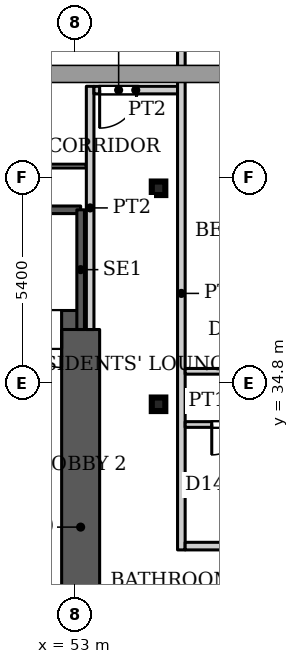
"""IFC4 building model, lengths in metres.
Left out: names, types, materials, properties, quantities, classifications, styles, units other than length and angle.
Written with IfcOpenShell. Run it as: python <this file> out.ifc"""

import sys

from ifc_helpers import new_model, si_unit, direction, frame, frame_2d, origin, origin_2d, place, context, subcontext, project, spatial, rectangle, hollow_rectangle, extrude, source, transform, mapped, element, fill, save


model = new_model("IFC4")
c1 = context("Model", 3, precision=1e-05, world=origin(), true_north=direction((0.0, 1.0)))
c2 = subcontext(c1, "Body", "Model", "MODEL_VIEW")
j1 = project(units=[si_unit("LENGTHUNIT", "METRE"), si_unit("PLANEANGLEUNIT", "RADIAN")], contexts=[c1])
p1 = place(None, origin())
s1 = spatial("IfcSite", under=j1, at=p1, CompositionType="ELEMENT")
p2 = place(p1, origin())
s2 = spatial("IfcBuilding", under=s1, at=p2, CompositionType="ELEMENT")
p3 = place(p2, frame((0.0, 0.0, 65.6)))
s3 = spatial("IfcBuildingStorey", under=s2, at=p3, CompositionType="ELEMENT", Elevation=65.6)
for number, where, z_axis, x_axis in (
    (1, (55.2, 34.232, 0.0), (0.0, 0.0, 1.0), (1.0, 0.0, 0.0)),
    (2, (55.2, 39.916, 0.0), (0.0, 0.0, 1.0), (1.0, 0.0, 0.0)),
):
    element("IfcColumn", number, at=place(p3, frame(where, z_axis=z_axis, x_axis=x_axis)), inside=s3, PredefinedType="COLUMN", context=c2, shape_type="SweptSolid", body=[
        extrude(hollow_rectangle(XDim=0.356, YDim=0.356, WallThickness=0.016, InnerFilletRadius=0.016, OuterFilletRadius=0.032, at=origin_2d()), origin(), (0.0, 0.0, 1.0), 3.9),
    ])
p4 = place(p3, frame((34.75, 36.2, 0.0), z_axis=(0.0, 0.0, 1.0), x_axis=(1.0, 0.0, 0.0)))
e3 = element("IfcWall", 3, at=p4, inside=s3, PredefinedType="SHEAR", context=c2, shape_type="SweptSolid", body=[
    extrude(rectangle(XDim=18.4, YDim=1.0, at=frame_2d((9.2, 0.0))), origin(), (0.0, 0.0, 1.0), 3.9),
])
p5 = place(p4, frame((16.9, 0.0, 0.0)))
e4 = element("IfcOpeningElement", 4, at=p5, cuts=e3, PredefinedType="OPENING", context=c2, shape_type="SweptSolid", body=[
    extrude(rectangle(XDim=1.0, YDim=2.2, at=frame_2d((0.5, 1.1))), frame((0.0, 0.51, 0.0), z_axis=(0.0, -1.0, 0.0), x_axis=(1.0, 0.0, 0.0)), (0.0, 0.0, 1.0), 1.02),
])
p6 = place(p3, frame((53.15, 25.8, 0.0), z_axis=(0.0, 0.0, 1.0), x_axis=(0.0, 1.0, 0.0)))
e5 = element("IfcWall", 5, at=p6, inside=s3, PredefinedType="SHEAR", context=c2, shape_type="SweptSolid", body=[
    extrude(rectangle(XDim=10.4, YDim=1.0, at=frame_2d((5.2, 0.0))), origin(), (0.0, 0.0, 1.0), 3.9),
])
p7 = place(p6, frame((1.175, 0.0, 0.0)))
e6 = element("IfcOpeningElement", 6, at=p7, cuts=e5, PredefinedType="OPENING", context=c2, shape_type="SweptSolid", body=[
    extrude(rectangle(XDim=0.9, YDim=2.2, at=frame_2d((0.45, 1.1))), frame((0.0, 0.51, 0.0), z_axis=(0.0, -1.0, 0.0), x_axis=(1.0, 0.0, 0.0)), (0.0, 0.0, 1.0), 1.02),
])
p8 = place(p3, frame((43.99, 39.35, 0.0), z_axis=(0.0, 0.0, 1.0), x_axis=(1.0, 0.0, 0.0)))
e7 = element("IfcWall", 7, at=p8, inside=s3, PredefinedType="SHEAR", context=c2, shape_type="SweptSolid", body=[
    extrude(rectangle(XDim=9.16, YDim=0.2, at=frame_2d((4.58, 0.0))), origin(), (0.0, 0.0, 1.0), 3.9),
])
p9 = place(p3, frame((53.15, 36.2, 0.0), z_axis=(0.0, 0.0, 1.0), x_axis=(0.0, 1.0, 0.0)))
e8 = element("IfcWall", 8, at=p9, inside=s3, PredefinedType="SHEAR", context=c2, shape_type="SweptSolid", body=[
    extrude(rectangle(XDim=3.15, YDim=0.2, at=frame_2d((1.575, 0.0))), origin(), (0.0, 0.0, 1.0), 3.9),
])
p10 = place(p3, frame((38.499, 40.5, 0.0), z_axis=(0.0, 0.0, 1.0), x_axis=(1.0, 0.0, 0.0)))
e9 = element("IfcWall", 9, at=p10, inside=s3, PredefinedType="PARTITIONING", context=c2, shape_type="SweptSolid", body=[
    extrude(rectangle(XDim=14.801, YDim=0.1, at=frame_2d((7.4, 0.0))), origin(), (0.0, 0.0, 1.0), 3.6),
])
p11 = place(p10, frame((6.701, 0.0, 0.0)))
e10 = element("IfcOpeningElement", 10, at=p11, cuts=e9, PredefinedType="OPENING", context=c2, shape_type="SweptSolid", body=[
    extrude(rectangle(XDim=1.0, YDim=2.1, at=frame_2d((0.5, 1.05))), frame((0.0, 0.06, 0.0), z_axis=(0.0, -1.0, 0.0), x_axis=(1.0, 0.0, 0.0)), (0.0, 0.0, 1.0), 0.12),
])
p12 = place(p3, frame((53.4, 36.199, 0.0), z_axis=(0.0, 0.0, 1.0), x_axis=(0.0, 1.0, 0.0)))
e11 = element("IfcWall", 11, at=p12, inside=s3, PredefinedType="PARTITIONING", context=c2, shape_type="SweptSolid", body=[
    extrude(rectangle(XDim=6.401, YDim=0.2, at=frame_2d((3.201, 0.0))), origin(), (0.0, 0.0, 1.0), 3.6),
])
p13 = place(p3, frame((53.5, 42.5, 0.0), z_axis=(0.0, 0.0, 1.0), x_axis=(1.0, 0.0, 0.0)))
e12 = element("IfcWall", 12, at=p13, inside=s3, PredefinedType="PARTITIONING", context=c2, shape_type="SweptSolid", body=[
    extrude(rectangle(XDim=2.2, YDim=0.2, at=frame_2d((1.1, 0.0))), origin(), (0.0, 0.0, 1.0), 3.6),
])
p14 = place(p13, frame((0.15, 0.0, 0.0)))
e13 = element("IfcOpeningElement", 13, at=p14, cuts=e12, PredefinedType="OPENING", context=c2, shape_type="SweptSolid", body=[
    extrude(rectangle(XDim=1.0, YDim=2.1, at=frame_2d((0.5, 1.05))), frame((0.0, 0.11, 0.0), z_axis=(0.0, -1.0, 0.0), x_axis=(1.0, 0.0, 0.0)), (0.0, 0.0, 1.0), 0.22),
])
p15 = place(p3, frame((55.8, 30.4, 0.0), z_axis=(0.0, 0.0, 1.0), x_axis=(0.0, 1.0, 0.0)))
e14 = element("IfcWall", 14, at=p15, inside=s3, PredefinedType="PARTITIONING", context=c2, shape_type="SweptSolid", body=[
    extrude(rectangle(XDim=13.5, YDim=0.2, at=frame_2d((6.75, 0.0))), origin(), (0.0, 0.0, 1.0), 3.6),
])
p16 = place(p3, frame((55.9, 30.5, 0.0), z_axis=(0.0, 0.0, 1.0), x_axis=(1.0, 0.0, 0.0)))
e15 = element("IfcWall", 15, at=p16, inside=s3, PredefinedType="PARTITIONING", context=c2, shape_type="SweptSolid", body=[
    extrude(rectangle(XDim=42.2, YDim=0.2, at=frame_2d((21.1, 0.0))), origin(), (0.0, 0.0, 1.0), 3.6),
])
p17 = place(p16, frame((14.7, 0.0, 0.0)))
e16 = element("IfcOpeningElement", 16, at=p17, cuts=e15, PredefinedType="OPENING", context=c2, shape_type="SweptSolid", body=[
    extrude(rectangle(XDim=1.0, YDim=2.1, at=frame_2d((0.5, 1.05))), frame((0.0, 0.11, 0.0), z_axis=(0.0, -1.0, 0.0), x_axis=(1.0, 0.0, 0.0)), (0.0, 0.0, 1.0), 0.22),
])
p18 = place(p16, frame((27.9, 0.0, 0.0)))
e17 = element("IfcOpeningElement", 17, at=p18, cuts=e15, PredefinedType="OPENING", context=c2, shape_type="SweptSolid", body=[
    extrude(rectangle(XDim=1.0, YDim=2.1, at=frame_2d((0.5, 1.05))), frame((0.0, 0.11, 0.0), z_axis=(0.0, -1.0, 0.0), x_axis=(1.0, 0.0, 0.0)), (0.0, 0.0, 1.0), 0.22),
])
p19 = place(p16, frame((39.0, 0.0, 0.0)))
e18 = element("IfcOpeningElement", 18, at=p19, cuts=e15, PredefinedType="OPENING", context=c2, shape_type="SweptSolid", body=[
    extrude(rectangle(XDim=1.0, YDim=2.1, at=frame_2d((0.5, 1.05))), frame((0.0, 0.11, 0.0), z_axis=(0.0, -1.0, 0.0), x_axis=(1.0, 0.0, 0.0)), (0.0, 0.0, 1.0), 0.22),
])
p20 = place(p3, frame((55.9, 33.7, 0.0), z_axis=(0.0, 0.0, 1.0), x_axis=(1.0, 0.0, 0.0)))
e19 = element("IfcWall", 19, at=p20, inside=s3, PredefinedType="PARTITIONING", context=c2, shape_type="SweptSolid", body=[
    extrude(rectangle(XDim=14.35, YDim=0.15, at=frame_2d((7.175, 0.0))), origin(), (0.0, 0.0, 1.0), 3.6),
])
p21 = place(p20, frame((0.7, 0.0, 0.0)))
e20 = element("IfcOpeningElement", 20, at=p21, cuts=e19, PredefinedType="OPENING", context=c2, shape_type="SweptSolid", body=[
    extrude(rectangle(XDim=0.8, YDim=2.1, at=frame_2d((0.4, 1.05))), frame((0.0, 0.085, 0.0), z_axis=(0.0, -1.0, 0.0), x_axis=(1.0, 0.0, 0.0)), (0.0, 0.0, 1.0), 0.17),
])
p22 = place(p20, frame((12.3, 0.0, 0.0)))
e21 = element("IfcOpeningElement", 21, at=p22, cuts=e19, PredefinedType="OPENING", context=c2, shape_type="SweptSolid", body=[
    extrude(rectangle(XDim=0.8, YDim=2.1, at=frame_2d((0.4, 1.05))), frame((0.0, 0.085, 0.0), z_axis=(0.0, -1.0, 0.0), x_axis=(1.0, 0.0, 0.0)), (0.0, 0.0, 1.0), 0.17),
])
p23 = place(p20, frame((3.35, 0.0, 0.0)))
e22 = element("IfcOpeningElement", 22, at=p23, cuts=e19, PredefinedType="OPENING", context=c2, shape_type="SweptSolid", body=[
    extrude(rectangle(XDim=0.9, YDim=2.1, at=frame_2d((0.45, 1.05))), frame((0.0, 0.085, 0.0), z_axis=(0.0, -1.0, 0.0), x_axis=(1.0, 0.0, 0.0)), (0.0, 0.0, 1.0), 0.17),
])
p24 = place(p20, frame((10.6, 0.0, 0.0)))
e23 = element("IfcOpeningElement", 23, at=p24, cuts=e19, PredefinedType="OPENING", context=c2, shape_type="SweptSolid", body=[
    extrude(rectangle(XDim=0.8, YDim=2.1, at=frame_2d((0.4, 1.05))), frame((0.0, 0.085, 0.0), z_axis=(0.0, -1.0, 0.0), x_axis=(1.0, 0.0, 0.0)), (0.0, 0.0, 1.0), 0.17),
])
p25 = place(p20, frame((7.3, 0.0, 0.0)))
e24 = element("IfcOpeningElement", 24, at=p25, cuts=e19, PredefinedType="OPENING", context=c2, shape_type="SweptSolid", body=[
    extrude(rectangle(XDim=0.8, YDim=2.1, at=frame_2d((0.4, 1.05))), frame((0.0, 0.085, 0.0), z_axis=(0.0, -1.0, 0.0), x_axis=(1.0, 0.0, 0.0)), (0.0, 0.0, 1.0), 0.17),
])
p26 = place(p20, frame((5.65, 0.0, 0.0)))
e25 = element("IfcOpeningElement", 25, at=p26, cuts=e19, PredefinedType="OPENING", context=c2, shape_type="SweptSolid", body=[
    extrude(rectangle(XDim=0.8, YDim=2.1, at=frame_2d((0.4, 1.05))), frame((0.0, 0.085, 0.0), z_axis=(0.0, -1.0, 0.0), x_axis=(1.0, 0.0, 0.0)), (0.0, 0.0, 1.0), 0.17),
])
p27 = place(p3, frame((55.9, 35.1, 0.0), z_axis=(0.0, 0.0, 1.0), x_axis=(1.0, 0.0, 0.0)))
e26 = element("IfcWall", 26, at=p27, inside=s3, PredefinedType="PARTITIONING", context=c2, shape_type="SweptSolid", body=[
    extrude(rectangle(XDim=18.4, YDim=0.15, at=frame_2d((9.2, 0.0))), origin(), (0.0, 0.0, 1.0), 3.6),
])
p28 = place(p27, frame((1.25, 0.0, 0.0)))
e27 = element("IfcOpeningElement", 27, at=p28, cuts=e26, PredefinedType="OPENING", context=c2, shape_type="SweptSolid", body=[
    extrude(rectangle(XDim=0.9, YDim=2.1, at=frame_2d((0.45, 1.05))), frame((0.0, 0.085, 0.0), z_axis=(0.0, -1.0, 0.0), x_axis=(1.0, 0.0, 0.0)), (0.0, 0.0, 1.0), 0.17),
])
p29 = place(p27, frame((9.2, 0.0, 0.0)))
e28 = element("IfcOpeningElement", 28, at=p29, cuts=e26, PredefinedType="OPENING", context=c2, shape_type="SweptSolid", body=[
    extrude(rectangle(XDim=0.9, YDim=2.1, at=frame_2d((0.45, 1.05))), frame((0.0, 0.085, 0.0), z_axis=(0.0, -1.0, 0.0), x_axis=(1.0, 0.0, 0.0)), (0.0, 0.0, 1.0), 0.17),
])
p30 = place(p27, frame((12.35, 0.0, 0.0)))
e29 = element("IfcOpeningElement", 29, at=p30, cuts=e26, PredefinedType="OPENING", context=c2, shape_type="SweptSolid", body=[
    extrude(rectangle(XDim=1.0, YDim=2.1, at=frame_2d((0.5, 1.05))), frame((0.0, 0.085, 0.0), z_axis=(0.0, -1.0, 0.0), x_axis=(1.0, 0.0, 0.0)), (0.0, 0.0, 1.0), 0.17),
])
p31 = place(p27, frame((15.9, 0.0, 0.0)))
e30 = element("IfcOpeningElement", 30, at=p31, cuts=e26, PredefinedType="OPENING", context=c2, shape_type="SweptSolid", body=[
    extrude(rectangle(XDim=1.6, YDim=2.1, at=frame_2d((0.8, 1.05))), frame((0.0, 0.085, 0.0), z_axis=(0.0, -1.0, 0.0), x_axis=(1.0, 0.0, 0.0)), (0.0, 0.0, 1.0), 0.17),
])
p32 = place(p27, frame((4.4, 0.0, 0.0)))
e31 = element("IfcOpeningElement", 31, at=p32, cuts=e26, PredefinedType="OPENING", context=c2, shape_type="SweptSolid", body=[
    extrude(rectangle(XDim=0.9, YDim=2.1, at=frame_2d((0.45, 1.05))), frame((0.0, 0.085, 0.0), z_axis=(0.0, -1.0, 0.0), x_axis=(1.0, 0.0, 0.0)), (0.0, 0.0, 1.0), 0.17),
])
m1 = source(origin(), c2, "Body", "SweptSolid", [
    extrude(rectangle(XDim=1.0, YDim=2.2, at=frame_2d((0.5, 1.1))), frame((0.0, 0.025, 0.0), z_axis=(0.0, -1.0, 0.0), x_axis=(1.0, 0.0, 0.0)), (0.0, 0.0, 1.0), 0.05),
])
p33 = place(p5, origin())
e32 = element("IfcDoor", 32, at=p33, inside=s3, OperationType="SINGLE_SWING_RIGHT", PredefinedType="DOOR", context=c2, shape_type="MappedRepresentation", body=[
    mapped(m1, transform((0.0, 0.0, 0.0), x_axis=(1.0, 0.0, 0.0), y_axis=(0.0, 1.0, 0.0), z_axis=(0.0, 0.0, 1.0), scale=1.0)),
])
fill(e4, e32)
m2 = source(origin(), c2, "Body", "SweptSolid", [
    extrude(rectangle(XDim=0.8, YDim=2.1, at=frame_2d((0.4, 1.05))), frame((0.0, 0.025, 0.0), z_axis=(0.0, -1.0, 0.0), x_axis=(1.0, 0.0, 0.0)), (0.0, 0.0, 1.0), 0.05),
])
p34 = place(p21, origin())
e33 = element("IfcDoor", 33, at=p34, inside=s3, OperationType="SINGLE_SWING_RIGHT", PredefinedType="DOOR", context=c2, shape_type="MappedRepresentation", body=[
    mapped(m2, transform((0.0, 0.0, 0.0), x_axis=(1.0, 0.0, 0.0), y_axis=(0.0, 1.0, 0.0), z_axis=(0.0, 0.0, 1.0), scale=1.0)),
])
fill(e20, e33)
m3 = source(origin(), c2, "Body", "SweptSolid", [
    extrude(rectangle(XDim=1.0, YDim=2.1, at=frame_2d((0.5, 1.05))), frame((0.0, 0.025, 0.0), z_axis=(0.0, -1.0, 0.0), x_axis=(1.0, 0.0, 0.0)), (0.0, 0.0, 1.0), 0.05),
])
p35 = place(p14, origin())
e34 = element("IfcDoor", 34, at=p35, inside=s3, OperationType="SINGLE_SWING_RIGHT", PredefinedType="DOOR", context=c2, shape_type="MappedRepresentation", body=[
    mapped(m3, transform((0.0, 0.0, 0.0), x_axis=(1.0, 0.0, 0.0), y_axis=(0.0, 1.0, 0.0), z_axis=(0.0, 0.0, 1.0), scale=1.0)),
])
fill(e13, e34)
save(model, sys.argv[1])
